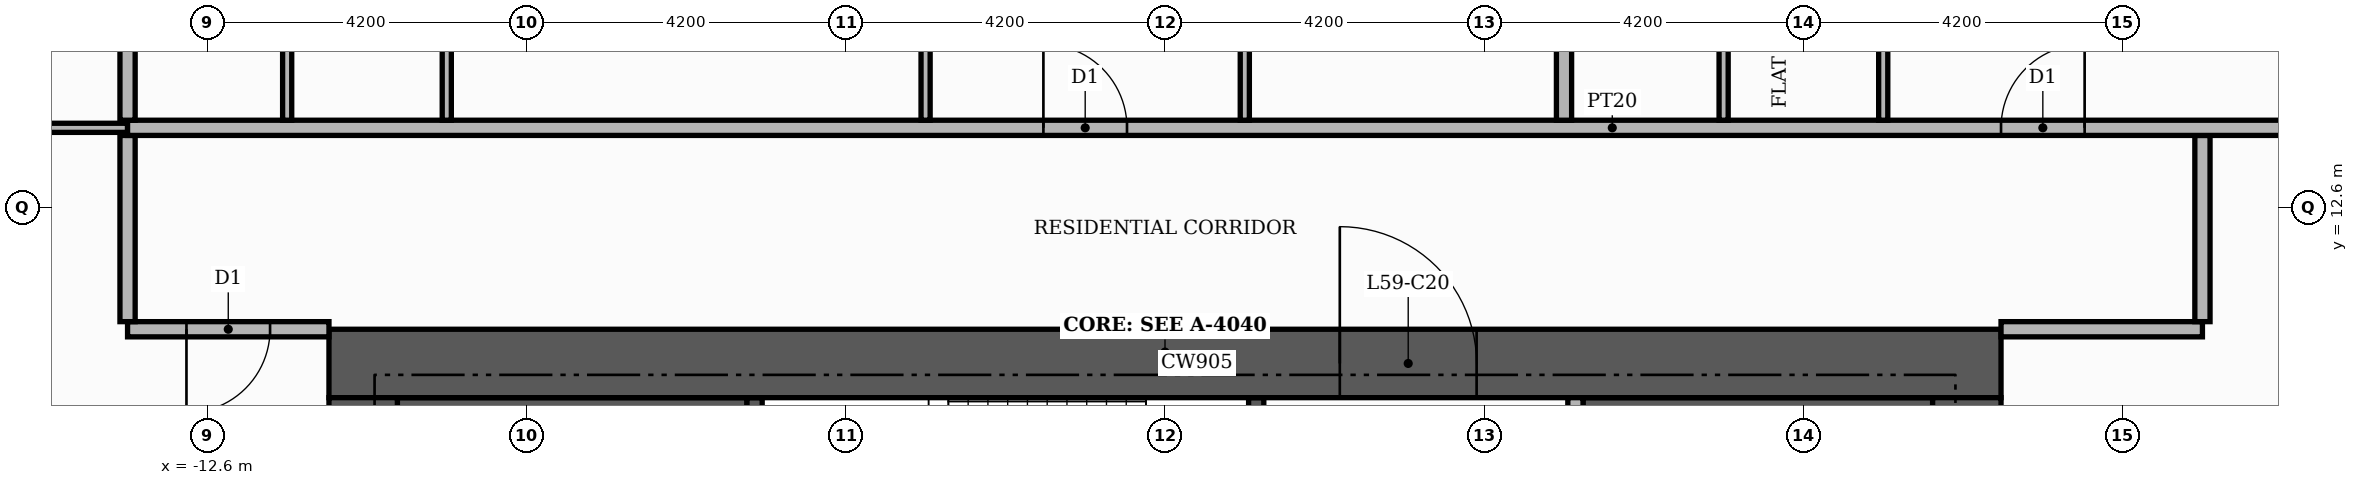
"""IFC4 building model, lengths in metres.
Left out: names, types, materials, properties, quantities, classifications, styles, units other than length and angle.
Written with IfcOpenShell. Run it as: python <this file> out.ifc"""

import sys

from ifc_helpers import new_model, si_unit, direction, frame, frame_2d, origin, place, context, subcontext, project, spatial, rectangle, extrude, element, fill, save


model = new_model("IFC4")
c1 = context("Model", 3, precision=1e-05, world=origin(), true_north=direction((0.0, 1.0)))
c2 = subcontext(c1, "Body", "Model", "MODEL_VIEW")
j1 = project(units=[si_unit("LENGTHUNIT", "METRE"), si_unit("PLANEANGLEUNIT", "RADIAN")], contexts=[c1])
p1 = place(None, origin())
s1 = spatial("IfcSite", under=j1, at=p1, CompositionType="ELEMENT")
p2 = place(p1, origin())
s2 = spatial("IfcBuilding", under=s1, at=p2, CompositionType="ELEMENT")
p3 = place(p2, frame((0.0, 0.0, 248.4)))
s3 = spatial("IfcBuildingStorey", under=s2, at=p3, CompositionType="ELEMENT", Elevation=248.4)
for number, where, z_axis, x_axis in (
    (1, (-10.1, 9.15, 0.0), (0.0, 0.0, 1.0), (1.0, 0.0, 0.0)),
    (2, (5.5, 9.15, 0.0), (0.0, 0.0, 1.0), (1.0, 0.0, 0.0)),
):
    element("IfcWall", number, at=place(p3, frame(where, z_axis=z_axis, x_axis=x_axis)), inside=s3, PredefinedType="SHEAR", context=c2, shape_type="SweptSolid", body=[
        extrude(rectangle(XDim=4.6, YDim=1.9, at=frame_2d((2.3, 0.0))), origin(), (0.0, 0.0, 1.0), 3.48),
    ])
p4 = place(p3, frame((-5.4, 7.25, 0.0), z_axis=(0.0, 0.0, 1.0), x_axis=(0.0, 1.0, 0.0)))
e3 = element("IfcWall", 3, at=p4, inside=s3, PredefinedType="SHEAR", context=c2, shape_type="SweptSolid", body=[
    extrude(rectangle(XDim=2.85, YDim=0.2, at=frame_2d((1.425, 0.0))), origin(), (0.0, 0.0, 1.0), 3.48),
])
p5 = place(p3, frame((1.2, 7.25, 0.0), z_axis=(0.0, 0.0, 1.0), x_axis=(0.0, 1.0, 0.0)))
e4 = element("IfcWall", 4, at=p5, inside=s3, PredefinedType="SHEAR", context=c2, shape_type="SweptSolid", body=[
    extrude(rectangle(XDim=2.85, YDim=0.2, at=frame_2d((1.425, 0.0))), origin(), (0.0, 0.0, 1.0), 3.48),
])
p6 = place(p5, frame((0.85, 0.0, 0.0)))
e5 = element("IfcOpeningElement", 5, at=p6, cuts=e4, PredefinedType="OPENING", context=c2, shape_type="SweptSolid", body=[
    extrude(rectangle(XDim=1.0, YDim=2.1, at=frame_2d((0.5, 1.05))), frame((0.0, 0.11, 0.0), z_axis=(0.0, -1.0, 0.0), x_axis=(1.0, 0.0, 0.0)), (0.0, 0.0, 1.0), 0.22),
])
p7 = place(p3, frame((-11.0, 10.55, 0.0), z_axis=(0.0, 0.0, 1.0), x_axis=(1.0, 0.0, 0.0)))
e6 = element("IfcWall", 6, at=p7, inside=s3, PredefinedType="SHEAR", context=c2, shape_type="SweptSolid", body=[
    extrude(rectangle(XDim=22.0, YDim=0.9, at=frame_2d((11.0, 0.0))), origin(), (0.0, 0.0, 1.0), 3.48),
])
p8 = place(p7, frame((13.3, 0.0, 0.0)))
e7 = element("IfcOpeningElement", 7, at=p8, cuts=e6, PredefinedType="OPENING", context=c2, shape_type="SweptSolid", body=[
    extrude(rectangle(XDim=1.8, YDim=2.2, at=frame_2d((0.9, 1.1))), frame((0.0, 0.46, 0.0), z_axis=(0.0, -1.0, 0.0), x_axis=(1.0, 0.0, 0.0)), (0.0, 0.0, 1.0), 0.92),
])
for number, where, z_axis, x_axis in (
    (8, (-10.55, -10.1, 0.0), (0.0, 0.0, 1.0), (0.0, 1.0, 0.0)),
    (9, (10.55, -10.1, 0.0), (0.0, 0.0, 1.0), (0.0, 1.0, 0.0)),
):
    element("IfcWall", number, at=place(p3, frame(where, z_axis=z_axis, x_axis=x_axis)), inside=s3, PredefinedType="SHEAR", context=c2, shape_type="SweptSolid", body=[
        extrude(rectangle(XDim=20.2, YDim=0.9, at=frame_2d((10.1, 0.0))), origin(), (0.0, 0.0, 1.0), 3.48),
    ])
p9 = place(p3, frame((5.4, 5.5, 0.0), z_axis=(0.0, 0.0, 1.0), x_axis=(0.0, 1.0, 0.0)))
e10 = element("IfcWall", 10, at=p9, inside=s3, PredefinedType="PARTITIONING", context=c2, shape_type="SweptSolid", body=[
    extrude(rectangle(XDim=4.6, YDim=0.2, at=frame_2d((2.3, 0.0))), origin(), (0.0, 0.0, 1.0), 3.48),
])
p10 = place(p9, frame((0.25, 0.0, 0.0)))
e11 = element("IfcOpeningElement", 11, at=p10, cuts=e10, PredefinedType="OPENING", context=c2, shape_type="SweptSolid", body=[
    extrude(rectangle(XDim=1.0, YDim=2.1, at=frame_2d((0.5, 1.05))), frame((0.0, 0.11, 0.0), z_axis=(0.0, -1.0, 0.0), x_axis=(1.0, 0.0, 0.0)), (0.0, 0.0, 1.0), 0.22),
])
p11 = place(p3, frame((-13.65, 11.0, 0.0), z_axis=(0.0, 0.0, 1.0), x_axis=(1.0, 0.0, 0.0)))
e12 = element("IfcWall", 12, at=p11, inside=s3, PredefinedType="PARTITIONING", context=c2, shape_type="SweptSolid", body=[
    extrude(rectangle(XDim=2.65, YDim=0.2, at=frame_2d((1.325, 0.0))), origin(), (0.0, 0.0, 1.0), 3.48),
])
p12 = place(p11, frame((0.775, 0.0, 0.0)))
e13 = element("IfcOpeningElement", 13, at=p12, cuts=e12, PredefinedType="OPENING", context=c2, shape_type="SweptSolid", body=[
    extrude(rectangle(XDim=1.1, YDim=2.4, at=frame_2d((0.55, 1.2))), frame((0.0, 0.11, 0.0), z_axis=(0.0, -1.0, 0.0), x_axis=(1.0, 0.0, 0.0)), (0.0, 0.0, 1.0), 0.22),
])
p13 = place(p3, frame((11.0, 11.0, 0.0), z_axis=(0.0, 0.0, 1.0), x_axis=(1.0, 0.0, 0.0)))
e14 = element("IfcWall", 14, at=p13, inside=s3, PredefinedType="PARTITIONING", context=c2, shape_type="SweptSolid", body=[
    extrude(rectangle(XDim=2.65, YDim=0.2, at=frame_2d((1.325, 0.0))), origin(), (0.0, 0.0, 1.0), 3.48),
])
for number, where, z_axis, x_axis in (
    (15, (-13.65, 11.1, 0.0), (0.0, 0.0, 1.0), (0.0, 1.0, 0.0)),
    (16, (13.65, 11.1, 0.0), (0.0, 0.0, 1.0), (0.0, 1.0, 0.0)),
):
    element("IfcWall", number, at=place(p3, frame(where, z_axis=z_axis, x_axis=x_axis)), inside=s3, PredefinedType="PARTITIONING", context=c2, shape_type="SweptSolid", body=[
        extrude(rectangle(XDim=2.45, YDim=0.2, at=frame_2d((1.225, 0.0))), origin(), (0.0, 0.0, 1.0), 3.48),
    ])
p14 = place(p3, frame((-19.82, 13.65, 0.0), z_axis=(0.0, 0.0, 1.0), x_axis=(1.0, 0.0, 0.0)))
e17 = element("IfcWall", 17, at=p14, inside=s3, PredefinedType="PARTITIONING", context=c2, shape_type="SweptSolid", body=[
    extrude(rectangle(XDim=6.17, YDim=0.12, at=frame_2d((3.085, 0.0))), origin(), (0.0, 0.0, 1.0), 3.48),
])
p15 = place(p14, frame((2.635, 0.0, 0.0)))
e18 = element("IfcOpeningElement", 18, at=p15, cuts=e17, PredefinedType="OPENING", context=c2, shape_type="SweptSolid", body=[
    extrude(rectangle(XDim=0.9, YDim=2.1, at=frame_2d((0.45, 1.05))), frame((0.0, 0.07, 0.0), z_axis=(0.0, -1.0, 0.0), x_axis=(1.0, 0.0, 0.0)), (0.0, 0.0, 1.0), 0.14),
])
p16 = place(p3, frame((-13.65, 13.65, 0.0), z_axis=(0.0, 0.0, 1.0), x_axis=(1.0, 0.0, 0.0)))
e19 = element("IfcWall", 19, at=p16, inside=s3, PredefinedType="PARTITIONING", context=c2, shape_type="SweptSolid", body=[
    extrude(rectangle(XDim=39.07, YDim=0.2, at=frame_2d((19.535, 0.0))), origin(), (0.0, 0.0, 1.0), 3.48),
])
p17 = place(p16, frame((24.65, 0.0, 0.0)))
e20 = element("IfcOpeningElement", 20, at=p17, cuts=e19, PredefinedType="OPENING", context=c2, shape_type="SweptSolid", body=[
    extrude(rectangle(XDim=1.1, YDim=2.4, at=frame_2d((0.55, 1.2))), frame((0.0, 0.11, 0.0), z_axis=(0.0, -1.0, 0.0), x_axis=(1.0, 0.0, 0.0)), (0.0, 0.0, 1.0), 0.22),
])
p18 = place(p16, frame((12.05, 0.0, 0.0)))
e21 = element("IfcOpeningElement", 21, at=p18, cuts=e19, PredefinedType="OPENING", context=c2, shape_type="SweptSolid", body=[
    extrude(rectangle(XDim=1.1, YDim=2.4, at=frame_2d((0.55, 1.2))), frame((0.0, 0.11, 0.0), z_axis=(0.0, -1.0, 0.0), x_axis=(1.0, 0.0, 0.0)), (0.0, 0.0, 1.0), 0.22),
])
p19 = place(p3, frame((-13.65, 13.75, 0.0), z_axis=(0.0, 0.0, 1.0), x_axis=(0.0, 1.0, 0.0)))
e22 = element("IfcWall", 22, at=p19, inside=s3, PredefinedType="PARTITIONING", context=c2, shape_type="SweptSolid", body=[
    extrude(rectangle(XDim=11.67, YDim=0.2, at=frame_2d((5.835, 0.0))), origin(), (0.0, 0.0, 1.0), 3.48),
])
for number, where, z_axis, x_axis in (
    (23, (-11.55, 13.75, 0.0), (0.0, 0.0, 1.0), (0.0, 1.0, 0.0)),
    (24, (-9.45, 13.75, 0.0), (0.0, 0.0, 1.0), (0.0, 1.0, 0.0)),
    (25, (-3.15, 13.75, 0.0), (0.0, 0.0, 1.0), (0.0, 1.0, 0.0)),
):
    element("IfcWall", number, at=place(p3, frame(where, z_axis=z_axis, x_axis=x_axis)), inside=s3, PredefinedType="PARTITIONING", context=c2, shape_type="SweptSolid", body=[
        extrude(rectangle(XDim=5.11, YDim=0.12, at=frame_2d((2.555, 0.0))), origin(), (0.0, 0.0, 1.0), 3.48),
    ])
p20 = place(p3, frame((1.05, 13.75, 0.0), z_axis=(0.0, 0.0, 1.0), x_axis=(0.0, 1.0, 0.0)))
e26 = element("IfcWall", 26, at=p20, inside=s3, PredefinedType="PARTITIONING", context=c2, shape_type="SweptSolid", body=[
    extrude(rectangle(XDim=5.11, YDim=0.12, at=frame_2d((2.555, 0.0))), origin(), (0.0, 0.0, 1.0), 3.48),
])
p21 = place(p20, frame((2.085, 0.0, 0.0)))
e27 = element("IfcOpeningElement", 27, at=p21, cuts=e26, PredefinedType="OPENING", context=c2, shape_type="SweptSolid", body=[
    extrude(rectangle(XDim=0.9, YDim=2.1, at=frame_2d((0.45, 1.05))), frame((0.0, 0.07, 0.0), z_axis=(0.0, -1.0, 0.0), x_axis=(1.0, 0.0, 0.0)), (0.0, 0.0, 1.0), 0.14),
])
p22 = place(p3, frame((5.25, 13.75, 0.0), z_axis=(0.0, 0.0, 1.0), x_axis=(0.0, 1.0, 0.0)))
e28 = element("IfcWall", 28, at=p22, inside=s3, PredefinedType="PARTITIONING", context=c2, shape_type="SweptSolid", body=[
    extrude(rectangle(XDim=11.67, YDim=0.2, at=frame_2d((5.835, 0.0))), origin(), (0.0, 0.0, 1.0), 3.48),
])
p23 = place(p3, frame((7.35, 13.75, 0.0), z_axis=(0.0, 0.0, 1.0), x_axis=(0.0, 1.0, 0.0)))
e29 = element("IfcWall", 29, at=p23, inside=s3, PredefinedType="PARTITIONING", context=c2, shape_type="SweptSolid", body=[
    extrude(rectangle(XDim=4.51, YDim=0.12, at=frame_2d((2.255, 0.0))), origin(), (0.0, 0.0, 1.0), 3.48),
])
p24 = place(p3, frame((9.45, 13.75, 0.0), z_axis=(0.0, 0.0, 1.0), x_axis=(0.0, 1.0, 0.0)))
e30 = element("IfcWall", 30, at=p24, inside=s3, PredefinedType="PARTITIONING", context=c2, shape_type="SweptSolid", body=[
    extrude(rectangle(XDim=4.51, YDim=0.12, at=frame_2d((2.255, 0.0))), origin(), (0.0, 0.0, 1.0), 3.48),
])
p25 = place(p24, frame((1.785, 0.0, 0.0)))
e31 = element("IfcOpeningElement", 31, at=p25, cuts=e30, PredefinedType="OPENING", context=c2, shape_type="SweptSolid", body=[
    extrude(rectangle(XDim=0.9, YDim=2.1, at=frame_2d((0.45, 1.05))), frame((0.0, 0.07, 0.0), z_axis=(0.0, -1.0, 0.0), x_axis=(1.0, 0.0, 0.0)), (0.0, 0.0, 1.0), 0.14),
])
p26 = place(p8, origin())
e32 = element("IfcDoor", 32, at=p26, inside=s3, OperationType="DOUBLE_DOOR_SINGLE_SWING", PredefinedType="DOOR", context=c2, shape_type="SweptSolid", body=[
    extrude(rectangle(XDim=1.8, YDim=2.2, at=frame_2d((0.9, 1.1))), frame((0.0, 0.025, 0.0), z_axis=(0.0, -1.0, 0.0), x_axis=(1.0, 0.0, 0.0)), (0.0, 0.0, 1.0), 0.05),
])
fill(e7, e32)
p27 = place(p17, origin())
e33 = element("IfcDoor", 33, at=p27, inside=s3, OperationType="SINGLE_SWING_RIGHT", PredefinedType="DOOR", context=c2, shape_type="SweptSolid", body=[
    extrude(rectangle(XDim=1.1, YDim=2.4, at=frame_2d((0.55, 1.2))), frame((0.0, 0.025, 0.0), z_axis=(0.0, -1.0, 0.0), x_axis=(1.0, 0.0, 0.0)), (0.0, 0.0, 1.0), 0.05),
])
fill(e20, e33)
p28 = place(p18, origin())
e34 = element("IfcDoor", 34, at=p28, inside=s3, OperationType="SINGLE_SWING_LEFT", PredefinedType="DOOR", context=c2, shape_type="SweptSolid", body=[
    extrude(rectangle(XDim=1.1, YDim=2.4, at=frame_2d((0.55, 1.2))), frame((0.0, 0.025, 0.0), z_axis=(0.0, -1.0, 0.0), x_axis=(1.0, 0.0, 0.0)), (0.0, 0.0, 1.0), 0.05),
])
fill(e21, e34)
p29 = place(p12, frame((1.1, 0.0, 0.0), z_axis=(0.0, 0.0, 1.0), x_axis=(-1.0, 0.0, 0.0)))
e35 = element("IfcDoor", 35, at=p29, inside=s3, OperationType="SINGLE_SWING_LEFT", PredefinedType="DOOR", context=c2, shape_type="SweptSolid", body=[
    extrude(rectangle(XDim=1.1, YDim=2.4, at=frame_2d((0.55, 1.2))), frame((0.0, 0.025, 0.0), z_axis=(0.0, -1.0, 0.0), x_axis=(1.0, 0.0, 0.0)), (0.0, 0.0, 1.0), 0.05),
])
fill(e13, e35)
save(model, sys.argv[1])
